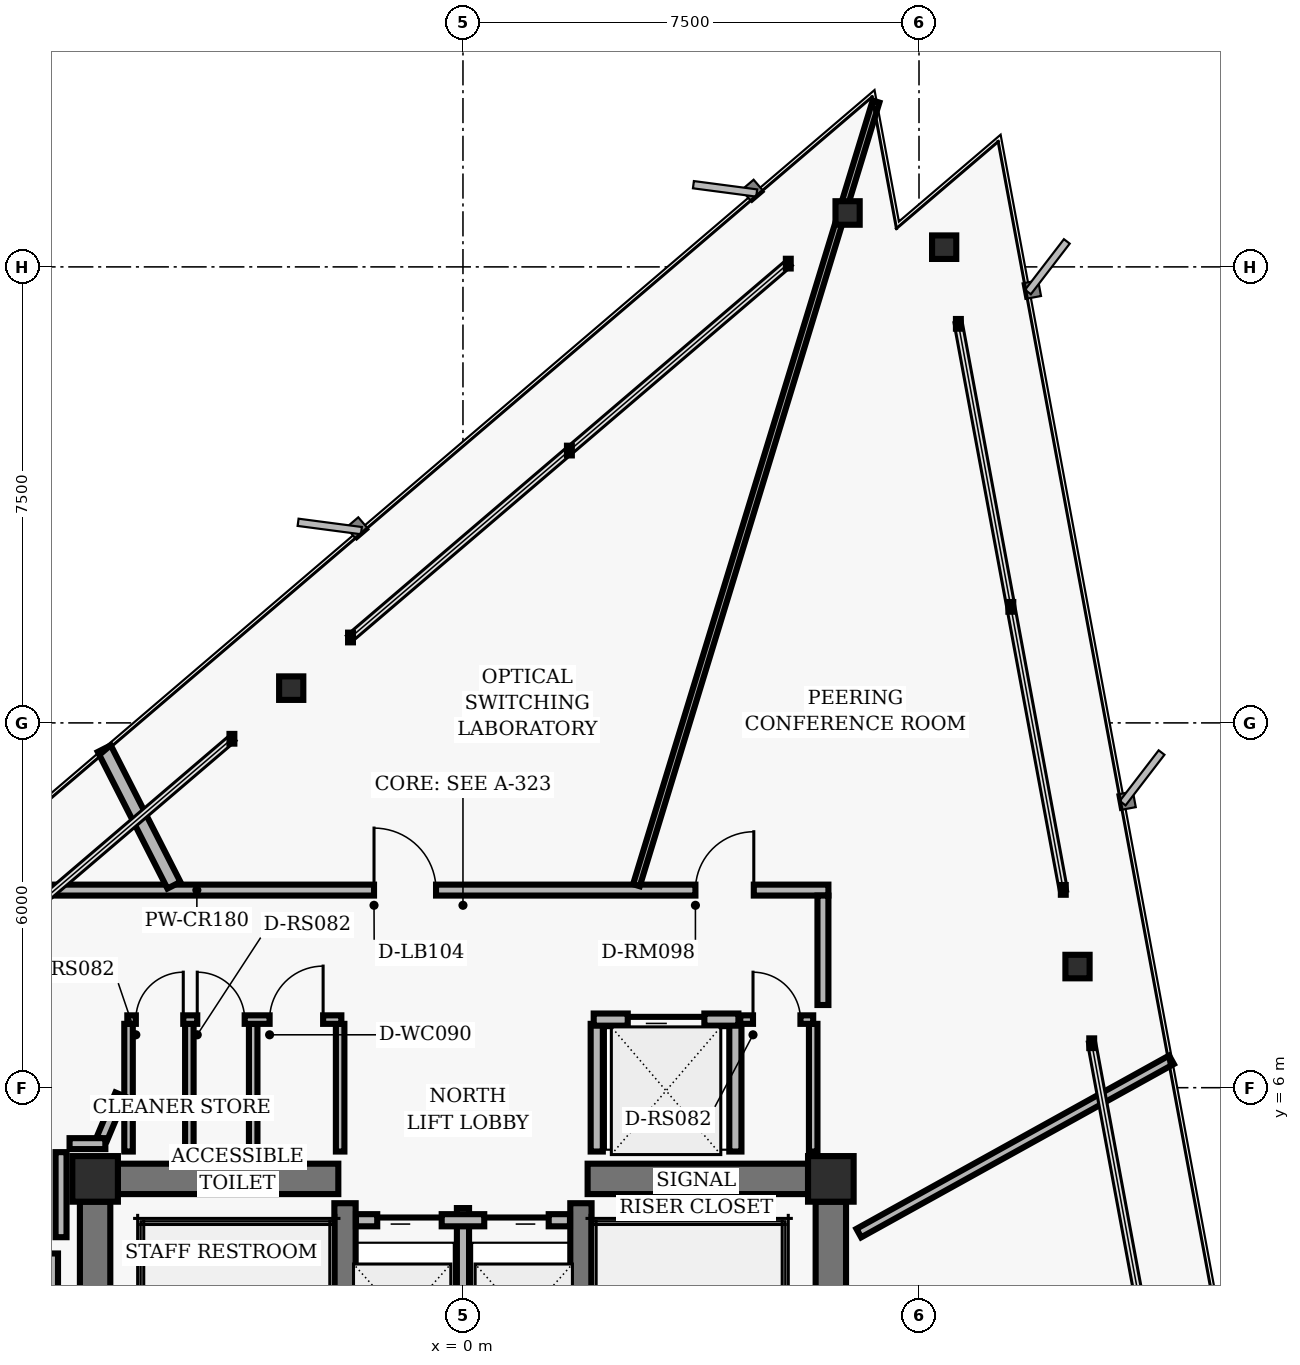
"""IFC4 building model, lengths in metres.
Left out: names, types, materials, properties, quantities, classifications, styles, units other than length and angle.
Written with IfcOpenShell. Run it as: python <this file> out.ifc"""

import sys

from ifc_helpers import new_model, si_unit, direction, frame, frame_2d, origin, origin_2d, place, context, subcontext, project, spatial, rectangle, hollow_rectangle, i_section, extrude, element, fill, save


model = new_model("IFC4")
c1 = context("Model", 3, precision=1e-05, world=origin(), true_north=direction((0.0, 1.0)))
c2 = subcontext(c1, "Body", "Model", "MODEL_VIEW")
j1 = project(units=[si_unit("LENGTHUNIT", "METRE"), si_unit("PLANEANGLEUNIT", "RADIAN")], contexts=[c1])
p1 = place(None, origin())
s1 = spatial("IfcSite", under=j1, at=p1, CompositionType="ELEMENT")
p2 = place(p1, origin())
s2 = spatial("IfcBuilding", under=s1, at=p2, CompositionType="ELEMENT")
p3 = place(p2, frame((0.0, 0.0, 181.44)))
s3 = spatial("IfcBuildingStorey", under=s2, at=p3, CompositionType="ELEMENT", Elevation=181.44)
for number, where, z_axis, x_axis in (
    (1, (-6.05, 4.5, 0.0), (0.0, 0.0, 1.0), (1.0, 0.0, 0.0)),
    (2, (6.05, 4.5, 0.0), (0.0, 0.0, 1.0), (1.0, 0.0, 0.0)),
):
    element("IfcColumn", number, at=place(p3, frame(where, z_axis=z_axis, x_axis=x_axis)), inside=s3, PredefinedType="COLUMN", context=c2, shape_type="SweptSolid", body=[
        extrude(hollow_rectangle(XDim=0.75, YDim=0.75, WallThickness=0.05, InnerFilletRadius=0.02, OuterFilletRadius=0.04, at=origin_2d()), origin(), (0.0, 0.0, 1.0), 3.04),
    ])
for number, where, z_axis, x_axis in (
    (3, (-6.05, 0.375, 0.0), (0.0, 0.0, 1.0), (0.0, 1.0, 0.0)),
    (4, (6.05, 0.375, 0.0), (0.0, 0.0, 1.0), (0.0, 1.0, 0.0)),
):
    element("IfcWall", number, at=place(p3, frame(where, z_axis=z_axis, x_axis=x_axis)), inside=s3, PredefinedType="SHEAR", context=c2, shape_type="SweptSolid", body=[
        extrude(rectangle(XDim=3.75, YDim=0.5, at=frame_2d((1.875, 0.0))), origin(), (0.0, 0.0, 1.0), 2.798),
    ])
for number, where, z_axis, x_axis in (
    (5, (-1.94, -4.1, 0.0), (0.0, 0.0, 1.0), (0.0, 1.0, 0.0)),
    (6, (1.94, -4.1, 0.0), (0.0, 0.0, 1.0), (0.0, 1.0, 0.0)),
):
    element("IfcWall", number, at=place(p3, frame(where, z_axis=z_axis, x_axis=x_axis)), inside=s3, PredefinedType="SHEAR", context=c2, shape_type="SweptSolid", body=[
        extrude(rectangle(XDim=8.2, YDim=0.35, at=frame_2d((4.1, 0.0))), origin(), (0.0, 0.0, 1.0), 2.798),
    ])
for number, where, z_axis, x_axis in (
    (7, (-5.675, 4.5, 0.0), (0.0, 0.0, 1.0), (1.0, 0.0, 0.0)),
    (8, (2.05, 4.5, 0.0), (0.0, 0.0, 1.0), (1.0, 0.0, 0.0)),
):
    element("IfcWall", number, at=place(p3, frame(where, z_axis=z_axis, x_axis=x_axis)), inside=s3, PredefinedType="SHEAR", context=c2, shape_type="SweptSolid", body=[
        extrude(rectangle(XDim=3.625, YDim=0.5, at=frame_2d((1.812, 0.0))), origin(), (0.0, 0.0, 1.0), 2.798),
    ])
for number, where, z_axis, x_axis in (
    (9, (10.107, 7.992, 0.0), (0.0, 0.0, 1.0), (1.0, 0.0, 0.0)),
    (10, (7.914, 19.824, 0.0), (0.0, 0.0, 1.0), (1.0, 0.0, 0.0)),
    (11, (6.325, 20.387, 0.0), (0.0, 0.0, 1.0), (1.0, 0.0, 0.0)),
    (12, (-2.825, 12.572, 0.0), (0.0, 0.0, 1.0), (1.0, 0.0, 0.0)),
):
    element("IfcColumn", number, at=place(p3, frame(where, z_axis=z_axis, x_axis=x_axis)), inside=s3, PredefinedType="COLUMN", context=c2, shape_type="SweptSolid", body=[
        extrude(i_section(OverallWidth=0.398, OverallDepth=0.387, WebThickness=0.021, FlangeThickness=0.033, FilletRadius=0.018, at=origin_2d()), origin(), (0.0, 0.0, 1.0), 3.04),
    ])
p4 = place(p3, frame((0.0, 1.25, 0.0), z_axis=(0.0, 0.0, 1.0), x_axis=(0.0, 1.0, 0.0)))
e13 = element("IfcWall", 13, at=p4, inside=s3, PredefinedType="PARTITIONING", context=c2, shape_type="SweptSolid", body=[
    extrude(rectangle(XDim=2.77, YDim=0.2, at=frame_2d((1.385, 0.0))), origin(), (0.0, 0.0, 1.0), 2.773),
])
p5 = place(p3, frame((-1.76, 3.82, 0.0), z_axis=(0.0, 0.0, 1.0), x_axis=(1.0, 0.0, 0.0)))
e14 = element("IfcWall", 14, at=p5, inside=s3, PredefinedType="PARTITIONING", context=c2, shape_type="SweptSolid", body=[
    extrude(rectangle(XDim=3.52, YDim=0.2, at=frame_2d((1.76, 0.0))), origin(), (0.0, 0.0, 1.0), 2.773),
])
p6 = place(p5, frame((0.35, 0.0, 0.0)))
e15 = element("IfcOpeningElement", 15, at=p6, cuts=e14, PredefinedType="OPENING", context=c2, shape_type="SweptSolid", body=[
    extrude(rectangle(XDim=1.06, YDim=2.04, at=frame_2d((0.53, 1.02))), frame((0.0, 0.11, 0.0), z_axis=(0.0, -1.0, 0.0), x_axis=(1.0, 0.0, 0.0)), (0.0, 0.0, 1.0), 0.22),
])
p7 = place(p5, frame((2.11, 0.0, 0.0)))
e16 = element("IfcOpeningElement", 16, at=p7, cuts=e14, PredefinedType="OPENING", context=c2, shape_type="SweptSolid", body=[
    extrude(rectangle(XDim=1.06, YDim=2.04, at=frame_2d((0.53, 1.02))), frame((0.0, 0.11, 0.0), z_axis=(0.0, -1.0, 0.0), x_axis=(1.0, 0.0, 0.0)), (0.0, 0.0, 1.0), 0.22),
])
for number, where, z_axis, x_axis in (
    (17, (2.2, 4.95, 0.0), (0.0, 0.0, 1.0), (0.0, 1.0, 0.0)),
    (18, (4.48, 4.95, 0.0), (0.0, 0.0, 1.0), (0.0, 1.0, 0.0)),
):
    element("IfcWall", number, at=place(p3, frame(where, z_axis=z_axis, x_axis=x_axis)), inside=s3, PredefinedType="PARTITIONING", context=c2, shape_type="SweptSolid", body=[
        extrude(rectangle(XDim=2.1, YDim=0.2, at=frame_2d((1.05, 0.0))), origin(), (0.0, 0.0, 1.0), 2.773),
    ])
p8 = place(p3, frame((2.15, 7.12, 0.0), z_axis=(0.0, 0.0, 1.0), x_axis=(1.0, 0.0, 0.0)))
e19 = element("IfcWall", 19, at=p8, inside=s3, PredefinedType="PARTITIONING", context=c2, shape_type="SweptSolid", body=[
    extrude(rectangle(XDim=2.38, YDim=0.2, at=frame_2d((1.19, 0.0))), origin(), (0.0, 0.0, 1.0), 2.773),
])
p9 = place(p8, frame((0.56, 0.0, 0.0)))
e20 = element("IfcOpeningElement", 20, at=p9, cuts=e19, PredefinedType="OPENING", context=c2, shape_type="SweptSolid", body=[
    extrude(rectangle(XDim=1.26, YDim=2.06, at=frame_2d((0.63, 1.03))), frame((0.0, 0.11, 0.0), z_axis=(0.0, -1.0, 0.0), x_axis=(1.0, 0.0, 0.0)), (0.0, 0.0, 1.0), 0.22),
])
for number, where, z_axis, x_axis in (
    (21, (-5.5, 4.95, 0.0), (0.0, 0.0, 1.0), (0.0, 1.0, 0.0)),
    (22, (-4.5, 4.95, 0.0), (0.0, 0.0, 1.0), (0.0, 1.0, 0.0)),
    (23, (-3.45, 4.95, 0.0), (0.0, 0.0, 1.0), (0.0, 1.0, 0.0)),
    (24, (-2.02, 4.95, 0.0), (0.0, 0.0, 1.0), (0.0, 1.0, 0.0)),
):
    element("IfcWall", number, at=place(p3, frame(where, z_axis=z_axis, x_axis=x_axis)), inside=s3, PredefinedType="PARTITIONING", context=c2, shape_type="SweptSolid", body=[
        extrude(rectangle(XDim=2.1, YDim=0.14, at=frame_2d((1.05, 0.0))), origin(), (0.0, 0.0, 1.0), 2.773),
    ])
p10 = place(p3, frame((-5.52, 7.12, 0.0), z_axis=(0.0, 0.0, 1.0), x_axis=(1.0, 0.0, 0.0)))
e25 = element("IfcWall", 25, at=p10, inside=s3, PredefinedType="PARTITIONING", context=c2, shape_type="SweptSolid", body=[
    extrude(rectangle(XDim=3.52, YDim=0.14, at=frame_2d((1.76, 0.0))), origin(), (0.0, 0.0, 1.0), 2.773),
])
p11 = place(p10, frame((0.14, 0.0, 0.0)))
e26 = element("IfcOpeningElement", 26, at=p11, cuts=e25, PredefinedType="OPENING", context=c2, shape_type="SweptSolid", body=[
    extrude(rectangle(XDim=0.78, YDim=2.01, at=frame_2d((0.39, 1.005))), frame((0.0, 0.08, 0.0), z_axis=(0.0, -1.0, 0.0), x_axis=(1.0, 0.0, 0.0)), (0.0, 0.0, 1.0), 0.16),
])
p12 = place(p10, frame((1.15, 0.0, 0.0)))
e27 = element("IfcOpeningElement", 27, at=p12, cuts=e25, PredefinedType="OPENING", context=c2, shape_type="SweptSolid", body=[
    extrude(rectangle(XDim=0.78, YDim=2.01, at=frame_2d((0.39, 1.005))), frame((0.0, 0.08, 0.0), z_axis=(0.0, -1.0, 0.0), x_axis=(1.0, 0.0, 0.0)), (0.0, 0.0, 1.0), 0.16),
])
p13 = place(p10, frame((2.34, 0.0, 0.0)))
e28 = element("IfcOpeningElement", 28, at=p13, cuts=e25, PredefinedType="OPENING", context=c2, shape_type="SweptSolid", body=[
    extrude(rectangle(XDim=0.88, YDim=2.02, at=frame_2d((0.44, 1.01))), frame((0.0, 0.08, 0.0), z_axis=(0.0, -1.0, 0.0), x_axis=(1.0, 0.0, 0.0)), (0.0, 0.0, 1.0), 0.16),
])
p14 = place(p3, frame((5.76, 4.95, 0.0), z_axis=(0.0, 0.0, 1.0), x_axis=(0.0, 1.0, 0.0)))
e29 = element("IfcWall", 29, at=p14, inside=s3, PredefinedType="PARTITIONING", context=c2, shape_type="SweptSolid", body=[
    extrude(rectangle(XDim=2.1, YDim=0.14, at=frame_2d((1.05, 0.0))), origin(), (0.0, 0.0, 1.0), 2.253),
])
p15 = place(p3, frame((4.56, 7.12, 0.0), z_axis=(0.0, 0.0, 1.0), x_axis=(1.0, 0.0, 0.0)))
e30 = element("IfcWall", 30, at=p15, inside=s3, PredefinedType="PARTITIONING", context=c2, shape_type="SweptSolid", body=[
    extrude(rectangle(XDim=1.2, YDim=0.14, at=frame_2d((0.6, 0.0))), origin(), (0.0, 0.0, 1.0), 2.773),
])
p16 = place(p15, frame((0.21, 0.0, 0.0)))
e31 = element("IfcOpeningElement", 31, at=p16, cuts=e30, PredefinedType="OPENING", context=c2, shape_type="SweptSolid", body=[
    extrude(rectangle(XDim=0.78, YDim=2.01, at=frame_2d((0.39, 1.005))), frame((0.0, 0.08, 0.0), z_axis=(0.0, -1.0, 0.0), x_axis=(1.0, 0.0, 0.0)), (0.0, 0.0, 1.0), 0.16),
])
p17 = place(p3, frame((-7.29, 9.25, 0.0), z_axis=(0.0, 0.0, 1.0), x_axis=(1.0, 0.0, 0.0)))
e32 = element("IfcWall", 32, at=p17, inside=s3, PredefinedType="PARTITIONING", context=c2, shape_type="SweptSolid", body=[
    extrude(rectangle(XDim=13.3, YDim=0.18, at=frame_2d((6.65, 0.0))), origin(), (0.0, 0.0, 1.0), 2.773),
])
p18 = place(p17, frame((11.113, 0.0, 0.0)))
e33 = element("IfcOpeningElement", 33, at=p18, cuts=e32, PredefinedType="OPENING", context=c2, shape_type="SweptSolid", body=[
    extrude(rectangle(XDim=0.96, YDim=2.02, at=frame_2d((0.48, 1.01))), frame((0.0, 0.1, 0.0), z_axis=(0.0, -1.0, 0.0), x_axis=(1.0, 0.0, 0.0)), (0.0, 0.0, 1.0), 0.2),
])
p19 = place(p17, frame((5.827, 0.0, 0.0)))
e34 = element("IfcOpeningElement", 34, at=p19, cuts=e32, PredefinedType="OPENING", context=c2, shape_type="SweptSolid", body=[
    extrude(rectangle(XDim=1.02, YDim=2.02, at=frame_2d((0.51, 1.01))), frame((0.0, 0.1, 0.0), z_axis=(0.0, -1.0, 0.0), x_axis=(1.0, 0.0, 0.0)), (0.0, 0.0, 1.0), 0.2),
])
p20 = place(p3, frame((5.92, 9.16, 0.0), z_axis=(0.0, 0.0, 1.0), x_axis=(0.0, -1.0, 0.0)))
e35 = element("IfcWall", 35, at=p20, inside=s3, PredefinedType="PARTITIONING", context=c2, shape_type="SweptSolid", body=[
    extrude(rectangle(XDim=1.8, YDim=0.18, at=frame_2d((0.9, 0.0))), origin(), (0.0, 0.0, 1.0), 2.253),
])
p21 = place(p3, frame((-5.632, 5.887, 0.0), z_axis=(0.0, 0.0, 1.0), x_axis=(-0.387792833522, -0.921746558588, 0.0)))
e36 = element("IfcWall", 36, at=p21, inside=s3, PredefinedType="PARTITIONING", context=c2, shape_type="SweptSolid", body=[
    extrude(rectangle(XDim=0.785, YDim=0.18, at=frame_2d((0.393, 0.0))), origin(), (0.0, 0.0, 1.0), 2.773),
])
p22 = place(p3, frame((-5.881, 5.08, 0.0), z_axis=(0.0, 0.0, 1.0), x_axis=(-1.0, 0.0, 0.0)))
e37 = element("IfcWall", 37, at=p22, inside=s3, PredefinedType="PARTITIONING", context=c2, shape_type="SweptSolid", body=[
    extrude(rectangle(XDim=0.589, YDim=0.18, at=frame_2d((0.294, 0.0))), origin(), (0.0, 0.0, 1.0), 2.773),
])
p23 = place(p3, frame((-6.61, 4.94, 0.0), z_axis=(0.0, 0.0, 1.0), x_axis=(0.0, -1.0, 0.0)))
e38 = element("IfcWall", 38, at=p23, inside=s3, PredefinedType="PARTITIONING", context=c2, shape_type="SweptSolid", body=[
    extrude(rectangle(XDim=1.399, YDim=0.18, at=frame_2d((0.699, 0.0))), origin(), (0.0, 0.0, 1.0), 2.773),
])
p24 = place(p3, frame((-6.75, 3.273, 0.0), z_axis=(0.0, 0.0, 1.0), x_axis=(0.0, -1.0, 0.0)))
e39 = element("IfcWall", 39, at=p24, inside=s3, PredefinedType="PARTITIONING", context=c2, shape_type="SweptSolid", body=[
    extrude(rectangle(XDim=6.547, YDim=0.18, at=frame_2d((3.273, 0.0))), origin(), (0.0, 0.0, 1.0), 2.773),
])
p25 = place(p3, frame((6.51, 3.609, 0.0), z_axis=(0.0, 0.0, 1.0), x_axis=(0.874634801292, 0.484782388675, 0.0)))
e40 = element("IfcWall", 40, at=p25, inside=s3, PredefinedType="PARTITIONING", context=c2, shape_type="SweptSolid", body=[
    extrude(rectangle(XDim=5.879, YDim=0.16, at=frame_2d((2.939, 0.0))), origin(), (0.0, 0.0, 1.0), 2.773),
])
p26 = place(p3, frame((2.853, 9.33, 0.0), z_axis=(0.0, 0.0, 1.0), x_axis=(0.292365790083, 0.95630656423, 0.0)))
e41 = element("IfcWall", 41, at=p26, inside=s3, PredefinedType="MOVABLE", context=c2, shape_type="SweptSolid", body=[
    extrude(rectangle(XDim=13.479, YDim=0.115, at=frame_2d((6.739, 0.0))), origin(), (0.0, 0.0, 1.0), 2.253),
])
p27 = place(p3, frame((-4.754, 9.33, 0.0), z_axis=(0.0, 0.0, 1.0), x_axis=(-0.453977993214, 0.891012896471, 0.0)))
e42 = element("IfcWall", 42, at=p27, inside=s3, PredefinedType="PARTITIONING", context=c2, shape_type="SweptSolid", body=[
    extrude(rectangle(XDim=2.522, YDim=0.24, at=frame_2d((1.261, 0.0))), origin(), (0.0, 0.0, 1.0), 2.773),
])
p28 = place(p6, origin())
e43 = element("IfcDoor", 43, at=p28, inside=s3, OperationType="SLIDING_TO_LEFT", PredefinedType="DOOR", context=c2, shape_type="SweptSolid", body=[
    extrude(rectangle(XDim=1.06, YDim=2.04, at=frame_2d((0.53, 1.02))), frame((0.0, 0.025, 0.0), z_axis=(0.0, -1.0, 0.0), x_axis=(1.0, 0.0, 0.0)), (0.0, 0.0, 1.0), 0.05),
])
fill(e15, e43)
p29 = place(p7, origin())
e44 = element("IfcDoor", 44, at=p29, inside=s3, OperationType="SLIDING_TO_RIGHT", PredefinedType="DOOR", context=c2, shape_type="SweptSolid", body=[
    extrude(rectangle(XDim=1.06, YDim=2.04, at=frame_2d((0.53, 1.02))), frame((0.0, 0.025, 0.0), z_axis=(0.0, -1.0, 0.0), x_axis=(1.0, 0.0, 0.0)), (0.0, 0.0, 1.0), 0.05),
])
fill(e16, e44)
p30 = place(p9, origin())
e45 = element("IfcDoor", 45, at=p30, inside=s3, OperationType="SLIDING_TO_LEFT", PredefinedType="DOOR", context=c2, shape_type="SweptSolid", body=[
    extrude(rectangle(XDim=1.26, YDim=2.06, at=frame_2d((0.63, 1.03))), frame((0.0, 0.025, 0.0), z_axis=(0.0, -1.0, 0.0), x_axis=(1.0, 0.0, 0.0)), (0.0, 0.0, 1.0), 0.05),
])
fill(e20, e45)
p31 = place(p11, origin())
e46 = element("IfcDoor", 46, at=p31, inside=s3, OperationType="SINGLE_SWING_RIGHT", PredefinedType="DOOR", context=c2, shape_type="SweptSolid", body=[
    extrude(rectangle(XDim=0.78, YDim=2.01, at=frame_2d((0.39, 1.005))), frame((0.0, 0.025, 0.0), z_axis=(0.0, -1.0, 0.0), x_axis=(1.0, 0.0, 0.0)), (0.0, 0.0, 1.0), 0.05),
])
fill(e26, e46)
p32 = place(p12, origin())
e47 = element("IfcDoor", 47, at=p32, inside=s3, OperationType="SINGLE_SWING_LEFT", PredefinedType="DOOR", context=c2, shape_type="SweptSolid", body=[
    extrude(rectangle(XDim=0.78, YDim=2.01, at=frame_2d((0.39, 1.005))), frame((0.0, 0.025, 0.0), z_axis=(0.0, -1.0, 0.0), x_axis=(1.0, 0.0, 0.0)), (0.0, 0.0, 1.0), 0.05),
])
fill(e27, e47)
p33 = place(p13, origin())
e48 = element("IfcDoor", 48, at=p33, inside=s3, OperationType="SINGLE_SWING_RIGHT", PredefinedType="DOOR", context=c2, shape_type="SweptSolid", body=[
    extrude(rectangle(XDim=0.88, YDim=2.02, at=frame_2d((0.44, 1.01))), frame((0.0, 0.025, 0.0), z_axis=(0.0, -1.0, 0.0), x_axis=(1.0, 0.0, 0.0)), (0.0, 0.0, 1.0), 0.05),
])
fill(e28, e48)
p34 = place(p16, origin())
e49 = element("IfcDoor", 49, at=p34, inside=s3, OperationType="SINGLE_SWING_LEFT", PredefinedType="DOOR", context=c2, shape_type="SweptSolid", body=[
    extrude(rectangle(XDim=0.78, YDim=2.01, at=frame_2d((0.39, 1.005))), frame((0.0, 0.025, 0.0), z_axis=(0.0, -1.0, 0.0), x_axis=(1.0, 0.0, 0.0)), (0.0, 0.0, 1.0), 0.05),
])
fill(e31, e49)
p35 = place(p18, origin())
e50 = element("IfcDoor", 50, at=p35, inside=s3, OperationType="SINGLE_SWING_RIGHT", PredefinedType="DOOR", context=c2, shape_type="SweptSolid", body=[
    extrude(rectangle(XDim=0.96, YDim=2.02, at=frame_2d((0.48, 1.01))), frame((0.0, 0.025, 0.0), z_axis=(0.0, -1.0, 0.0), x_axis=(1.0, 0.0, 0.0)), (0.0, 0.0, 1.0), 0.05),
])
fill(e33, e50)
p36 = place(p19, origin())
e51 = element("IfcDoor", 51, at=p36, inside=s3, OperationType="SINGLE_SWING_LEFT", PredefinedType="DOOR", context=c2, shape_type="SweptSolid", body=[
    extrude(rectangle(XDim=1.02, YDim=2.02, at=frame_2d((0.51, 1.01))), frame((0.0, 0.025, 0.0), z_axis=(0.0, -1.0, 0.0), x_axis=(1.0, 0.0, 0.0)), (0.0, 0.0, 1.0), 0.05),
])
fill(e34, e51)
save(model, sys.argv[1])
